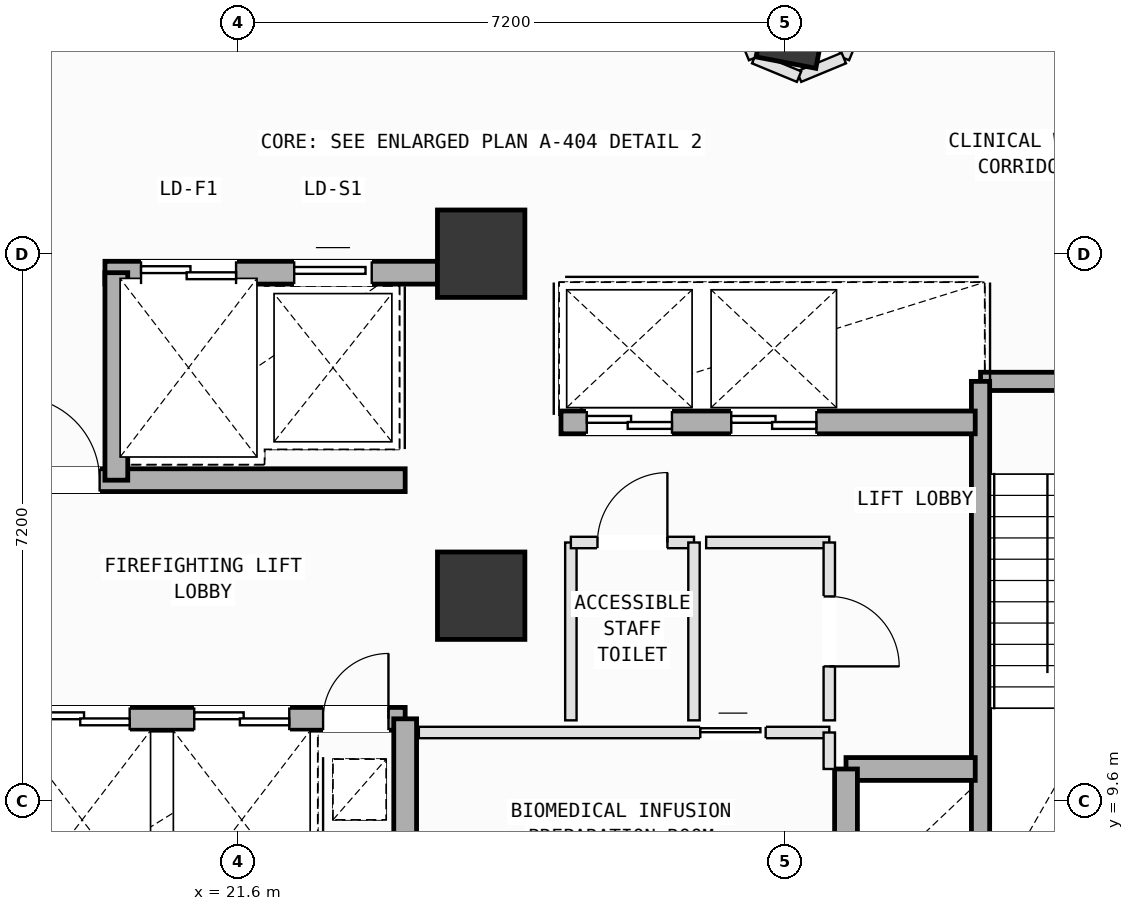
"""IFC4 building model, lengths in metres.
Left out: names, types, materials, properties, quantities, classifications, styles, units other than length and angle.
Written with IfcOpenShell. Run it as: python <this file> out.ifc"""

import sys

from ifc_helpers import new_model, si_unit, direction, frame, frame_2d, origin, origin_2d, place, context, subcontext, project, spatial, rectangle, extrude, element, fill, save


model = new_model("IFC4")
c1 = context("Model", 3, precision=1e-05, world=origin(), true_north=direction((0.0, 1.0)))
c2 = subcontext(c1, "Body", "Model", "MODEL_VIEW")
j1 = project(units=[si_unit("LENGTHUNIT", "METRE"), si_unit("PLANEANGLEUNIT", "RADIAN")], contexts=[c1])
p1 = place(None, origin())
s1 = spatial("IfcSite", under=j1, at=p1, CompositionType="ELEMENT")
p2 = place(p1, origin())
s2 = spatial("IfcBuilding", under=s1, at=p2, CompositionType="ELEMENT")
p3 = place(p2, frame((0.0, 0.0, 169.8)))
s3 = spatial("IfcBuildingStorey", under=s2, at=p3, CompositionType="ELEMENT", Elevation=169.8)
for number, where, z_axis, x_axis in (
    (1, (24.8, 12.3, 0.0), (0.0, 0.0, 1.0), (1.0, 0.0, 0.0)),
    (2, (24.8, 16.8, 0.0), (0.0, 0.0, 1.0), (1.0, 0.0, 0.0)),
):
    element("IfcColumn", number, at=place(p3, frame(where, z_axis=z_axis, x_axis=x_axis)), inside=s3, PredefinedType="COLUMN", context=c2, shape_type="SweptSolid", body=[
        extrude(rectangle(XDim=1.15, YDim=1.15, at=origin_2d()), origin(), (0.0, 0.0, 1.0), 4.0),
    ])
p4 = place(p3, frame((28.941, 20.002, 0.002), z_axis=(0.020030194878, -0.019114179869, 0.99961664623), x_axis=(-0.581006277016, 0.813444565277, 0.027196420538)))
e3 = element("IfcColumn", 3, at=p4, inside=s3, PredefinedType="COLUMN", context=c2, shape_type="SweptSolid", body=[
    extrude(rectangle(XDim=1.4, YDim=0.8, at=origin_2d()), origin(), (0.0, 0.0, 1.0), 3.998),
])
p5 = place(p3, frame((31.37, 15.12, 0.0), z_axis=(0.0, 0.0, 1.0), x_axis=(1.0, 0.0, 0.0)))
e4 = element("IfcWall", 4, at=p5, inside=s3, PredefinedType="SOLIDWALL", context=c2, shape_type="SweptSolid", body=[
    extrude(rectangle(XDim=3.46, YDim=0.24, at=frame_2d((1.73, 0.0))), origin(), (0.0, 0.0, 1.0), 3.78),
])
p6 = place(p5, frame((2.14, 0.0, 0.0)))
e5 = element("IfcOpeningElement", 5, at=p6, cuts=e4, PredefinedType="OPENING", context=c2, shape_type="SweptSolid", body=[
    extrude(rectangle(XDim=1.1, YDim=2.15, at=frame_2d((0.55, 1.075))), frame((0.0, 0.13, 0.0), z_axis=(0.0, -1.0, 0.0), x_axis=(1.0, 0.0, 0.0)), (0.0, 0.0, 1.0), 0.26),
])
p7 = place(p3, frame((31.37, 8.075, 0.0), z_axis=(0.0, 0.0, 1.0), x_axis=(0.0, 1.0, 0.0)))
e6 = element("IfcWall", 6, at=p7, inside=s3, PredefinedType="SOLIDWALL", context=c2, shape_type="SweptSolid", body=[
    extrude(rectangle(XDim=7.045, YDim=0.24, at=frame_2d((3.522, 0.0))), origin(), (0.0, 0.0, 1.0), 3.78),
])
p8 = place(p3, frame((19.85, 16.55, 0.0), z_axis=(0.0, 0.0, 1.0), x_axis=(1.0, 0.0, 0.0)))
e7 = element("IfcWall", 7, at=p8, inside=s3, PredefinedType="SOLIDWALL", context=c2, shape_type="SweptSolid", body=[
    extrude(rectangle(XDim=4.375, YDim=0.3, at=frame_2d((2.188, 0.0))), origin(), (0.0, 0.0, 1.0), 3.78),
])
p9 = place(p8, frame((0.475, 0.0, 0.0)))
e8 = element("IfcOpeningElement", 8, at=p9, cuts=e7, PredefinedType="OPENING", context=c2, shape_type="SweptSolid", body=[
    extrude(rectangle(XDim=1.25, YDim=2.18, at=frame_2d((0.625, 1.09))), frame((0.0, 0.16, 0.0), z_axis=(0.0, -1.0, 0.0), x_axis=(1.0, 0.0, 0.0)), (0.0, 0.0, 1.0), 0.32),
])
p10 = place(p8, frame((2.49, 0.0, 0.0)))
e9 = element("IfcOpeningElement", 9, at=p10, cuts=e7, PredefinedType="OPENING", context=c2, shape_type="SweptSolid", body=[
    extrude(rectangle(XDim=1.02, YDim=2.12, at=frame_2d((0.51, 1.06))), frame((0.0, 0.16, 0.0), z_axis=(0.0, -1.0, 0.0), x_axis=(1.0, 0.0, 0.0)), (0.0, 0.0, 1.0), 0.32),
])
p11 = place(p3, frame((18.5, 10.68, 0.0), z_axis=(0.0, 0.0, 1.0), x_axis=(1.0, 0.0, 0.0)))
e10 = element("IfcWall", 10, at=p11, inside=s3, PredefinedType="SOLIDWALL", context=c2, shape_type="SweptSolid", body=[
    extrude(rectangle(XDim=5.3, YDim=0.3, at=frame_2d((2.65, 0.0))), origin(), (0.0, 0.0, 1.0), 3.78),
])
p12 = place(p11, frame((4.22, 0.0, 0.0)))
e11 = element("IfcOpeningElement", 11, at=p12, cuts=e10, PredefinedType="OPENING", context=c2, shape_type="SweptSolid", body=[
    extrude(rectangle(XDim=0.86, YDim=2.06, at=frame_2d((0.43, 1.03))), frame((0.0, 0.16, 0.0), z_axis=(0.0, -1.0, 0.0), x_axis=(1.0, 0.0, 0.0)), (0.0, 0.0, 1.0), 0.32),
])
p13 = place(p11, frame((0.425, 0.0, 0.0)))
e12 = element("IfcOpeningElement", 12, at=p13, cuts=e10, PredefinedType="OPENING", context=c2, shape_type="SweptSolid", body=[
    extrude(rectangle(XDim=1.25, YDim=2.18, at=frame_2d((0.625, 1.09))), frame((0.0, 0.16, 0.0), z_axis=(0.0, -1.0, 0.0), x_axis=(1.0, 0.0, 0.0)), (0.0, 0.0, 1.0), 0.32),
])
p14 = place(p11, frame((2.525, 0.0, 0.0)))
e13 = element("IfcOpeningElement", 13, at=p14, cuts=e10, PredefinedType="OPENING", context=c2, shape_type="SweptSolid", body=[
    extrude(rectangle(XDim=1.25, YDim=2.18, at=frame_2d((0.625, 1.09))), frame((0.0, 0.16, 0.0), z_axis=(0.0, -1.0, 0.0), x_axis=(1.0, 0.0, 0.0)), (0.0, 0.0, 1.0), 0.32),
])
p15 = place(p3, frame((18.5, 13.82, 0.0), z_axis=(0.0, 0.0, 1.0), x_axis=(1.0, 0.0, 0.0)))
e14 = element("IfcWall", 14, at=p15, inside=s3, PredefinedType="SOLIDWALL", context=c2, shape_type="SweptSolid", body=[
    extrude(rectangle(XDim=5.3, YDim=0.3, at=frame_2d((2.65, 0.0))), origin(), (0.0, 0.0, 1.0), 3.78),
])
p16 = place(p15, frame((0.18, 0.0, 0.0)))
e15 = element("IfcOpeningElement", 15, at=p16, cuts=e14, PredefinedType="OPENING", context=c2, shape_type="SweptSolid", body=[
    extrude(rectangle(XDim=1.1, YDim=2.15, at=frame_2d((0.55, 1.075))), frame((0.0, 0.16, 0.0), z_axis=(0.0, -1.0, 0.0), x_axis=(1.0, 0.0, 0.0)), (0.0, 0.0, 1.0), 0.32),
])
p17 = place(p3, frame((23.8, 8.075, 0.0), z_axis=(0.0, 0.0, 1.0), x_axis=(0.0, 1.0, 0.0)))
e16 = element("IfcWall", 16, at=p17, inside=s3, PredefinedType="SOLIDWALL", context=c2, shape_type="SweptSolid", body=[
    extrude(rectangle(XDim=2.605, YDim=0.3, at=frame_2d((1.302, 0.0))), origin(), (0.0, 0.0, 1.0), 3.78),
])
p18 = place(p3, frame((20.0, 13.82, 0.0), z_axis=(0.0, 0.0, 1.0), x_axis=(0.0, 1.0, 0.0)))
e17 = element("IfcWall", 17, at=p18, inside=s3, PredefinedType="SOLIDWALL", context=c2, shape_type="SweptSolid", body=[
    extrude(rectangle(XDim=2.73, YDim=0.3, at=frame_2d((1.365, 0.0))), origin(), (0.0, 0.0, 1.0), 3.78),
])
p19 = place(p3, frame((29.6, 10.02, 0.0), z_axis=(0.0, 0.0, 1.0), x_axis=(1.0, 0.0, 0.0)))
e18 = element("IfcWall", 18, at=p19, inside=s3, PredefinedType="SOLIDWALL", context=c2, shape_type="SweptSolid", body=[
    extrude(rectangle(XDim=1.7, YDim=0.3, at=frame_2d((0.85, 0.0))), origin(), (0.0, 0.0, 1.0), 3.78),
])
p20 = place(p3, frame((29.6, 8.075, 0.0), z_axis=(0.0, 0.0, 1.0), x_axis=(0.0, 1.0, 0.0)))
e19 = element("IfcWall", 19, at=p20, inside=s3, PredefinedType="SOLIDWALL", context=c2, shape_type="SweptSolid", body=[
    extrude(rectangle(XDim=1.945, YDim=0.3, at=frame_2d((0.973, 0.0))), origin(), (0.0, 0.0, 1.0), 3.78),
])
p21 = place(p3, frame((25.85, 14.58, 0.0), z_axis=(0.0, 0.0, 1.0), x_axis=(1.0, 0.0, 0.0)))
e20 = element("IfcWall", 20, at=p21, inside=s3, PredefinedType="SOLIDWALL", context=c2, shape_type="SweptSolid", body=[
    extrude(rectangle(XDim=5.45, YDim=0.3, at=frame_2d((2.725, 0.0))), origin(), (0.0, 0.0, 1.0), 3.78),
])
p22 = place(p21, frame((0.34, 0.0, 0.0)))
e21 = element("IfcOpeningElement", 21, at=p22, cuts=e20, PredefinedType="OPENING", context=c2, shape_type="SweptSolid", body=[
    extrude(rectangle(XDim=1.12, YDim=2.15, at=frame_2d((0.56, 1.075))), frame((0.0, 0.16, 0.0), z_axis=(0.0, -1.0, 0.0), x_axis=(1.0, 0.0, 0.0)), (0.0, 0.0, 1.0), 0.32),
])
p23 = place(p21, frame((2.24, 0.0, 0.0)))
e22 = element("IfcOpeningElement", 22, at=p23, cuts=e20, PredefinedType="OPENING", context=c2, shape_type="SweptSolid", body=[
    extrude(rectangle(XDim=1.12, YDim=2.15, at=frame_2d((0.56, 1.075))), frame((0.0, 0.16, 0.0), z_axis=(0.0, -1.0, 0.0), x_axis=(1.0, 0.0, 0.0)), (0.0, 0.0, 1.0), 0.32),
])
p24 = place(p3, frame((23.98, 10.5, 0.0), z_axis=(0.0, 0.0, 1.0), x_axis=(1.0, 0.0, 0.0)))
e23 = element("IfcWall", 23, at=p24, inside=s3, PredefinedType="PARTITIONING", context=c2, shape_type="SweptSolid", body=[
    extrude(rectangle(XDim=5.4, YDim=0.15, at=frame_2d((2.7, 0.0))), origin(), (0.0, 0.0, 1.0), 3.78),
])
p25 = place(p24, frame((3.703, 0.0, 0.0)))
e24 = element("IfcOpeningElement", 24, at=p25, cuts=e23, PredefinedType="OPENING", context=c2, shape_type="SweptSolid", body=[
    extrude(rectangle(XDim=0.86, YDim=2.06, at=frame_2d((0.43, 1.03))), frame((0.0, 0.085, 0.0), z_axis=(0.0, -1.0, 0.0), x_axis=(1.0, 0.0, 0.0)), (0.0, 0.0, 1.0), 0.17),
])
p26 = place(p3, frame((29.38, 10.5, 0.0), z_axis=(0.0, 0.0, 1.0), x_axis=(0.0, -1.0, 0.0)))
e25 = element("IfcWall", 25, at=p26, inside=s3, PredefinedType="PARTITIONING", context=c2, shape_type="SweptSolid", body=[
    extrude(rectangle(XDim=0.48, YDim=0.15, at=frame_2d((0.24, 0.0))), origin(), (0.0, 0.0, 1.0), 3.78),
])
p27 = place(p3, frame((25.98, 10.66, 0.0), z_axis=(0.0, 0.0, 1.0), x_axis=(0.0, 1.0, 0.0)))
e26 = element("IfcWall", 26, at=p27, inside=s3, PredefinedType="PARTITIONING", context=c2, shape_type="SweptSolid", body=[
    extrude(rectangle(XDim=2.34, YDim=0.15, at=frame_2d((1.17, 0.0))), origin(), (0.0, 0.0, 1.0), 3.78),
])
p28 = place(p3, frame((25.98, 13.0, 0.0), z_axis=(0.0, 0.0, 1.0), x_axis=(1.0, 0.0, 0.0)))
e27 = element("IfcWall", 27, at=p28, inside=s3, PredefinedType="PARTITIONING", context=c2, shape_type="SweptSolid", body=[
    extrude(rectangle(XDim=1.62, YDim=0.15, at=frame_2d((0.81, 0.0))), origin(), (0.0, 0.0, 1.0), 3.78),
])
p29 = place(p28, frame((0.35, 0.0, 0.0)))
e28 = element("IfcOpeningElement", 28, at=p29, cuts=e27, PredefinedType="OPENING", context=c2, shape_type="SweptSolid", body=[
    extrude(rectangle(XDim=0.92, YDim=2.1, at=frame_2d((0.46, 1.05))), frame((0.0, 0.085, 0.0), z_axis=(0.0, -1.0, 0.0), x_axis=(1.0, 0.0, 0.0)), (0.0, 0.0, 1.0), 0.17),
])
p30 = place(p3, frame((27.6, 13.0, 0.0), z_axis=(0.0, 0.0, 1.0), x_axis=(0.0, -1.0, 0.0)))
e29 = element("IfcWall", 29, at=p30, inside=s3, PredefinedType="PARTITIONING", context=c2, shape_type="SweptSolid", body=[
    extrude(rectangle(XDim=2.34, YDim=0.15, at=frame_2d((1.17, 0.0))), origin(), (0.0, 0.0, 1.0), 3.78),
])
p31 = place(p3, frame((27.76, 13.0, 0.0), z_axis=(0.0, 0.0, 1.0), x_axis=(1.0, 0.0, 0.0)))
e30 = element("IfcWall", 30, at=p31, inside=s3, PredefinedType="PARTITIONING", context=c2, shape_type="SweptSolid", body=[
    extrude(rectangle(XDim=1.62, YDim=0.15, at=frame_2d((0.81, 0.0))), origin(), (0.0, 0.0, 1.0), 3.78),
])
p32 = place(p3, frame((29.38, 13.0, 0.0), z_axis=(0.0, 0.0, 1.0), x_axis=(0.0, -1.0, 0.0)))
e31 = element("IfcWall", 31, at=p32, inside=s3, PredefinedType="PARTITIONING", context=c2, shape_type="SweptSolid", body=[
    extrude(rectangle(XDim=2.34, YDim=0.15, at=frame_2d((1.17, 0.0))), origin(), (0.0, 0.0, 1.0), 3.78),
])
p33 = place(p32, frame((0.71, 0.0, 0.0)))
e32 = element("IfcOpeningElement", 32, at=p33, cuts=e31, PredefinedType="OPENING", context=c2, shape_type="SweptSolid", body=[
    extrude(rectangle(XDim=0.92, YDim=2.1, at=frame_2d((0.46, 1.05))), frame((0.0, 0.085, 0.0), z_axis=(0.0, -1.0, 0.0), x_axis=(1.0, 0.0, 0.0)), (0.0, 0.0, 1.0), 0.17),
])
p34 = place(p3, frame((29.815, 19.964, 0.0), z_axis=(0.0, 0.0, 1.0), x_axis=(-0.381980268386, -0.924170479167, 0.0)))
e33 = element("IfcWall", 33, at=p34, inside=s3, PredefinedType="PARTITIONING", context=c2, shape_type="SweptSolid", body=[
    extrude(rectangle(XDim=0.638, YDim=0.15, at=frame_2d((0.319, 0.0))), origin(), (0.0, 0.0, 1.0), 3.78),
])
p35 = place(p3, frame((29.571, 19.374, 0.0), z_axis=(0.0, 0.0, 1.0), x_axis=(-0.923811477415, -0.382847690599, 0.0)))
e34 = element("IfcWall", 34, at=p35, inside=s3, PredefinedType="PARTITIONING", context=c2, shape_type="SweptSolid", body=[
    extrude(rectangle(XDim=0.638, YDim=0.15, at=frame_2d((0.319, 0.0))), origin(), (0.0, 0.0, 1.0), 3.415),
])
p36 = place(p3, frame((28.982, 19.13, 0.0), z_axis=(0.0, 0.0, 1.0), x_axis=(-0.923979554509, 0.382441868588, 0.0)))
e35 = element("IfcWall", 35, at=p36, inside=s3, PredefinedType="PARTITIONING", context=c2, shape_type="SweptSolid", body=[
    extrude(rectangle(XDim=0.638, YDim=0.15, at=frame_2d((0.319, 0.0))), origin(), (0.0, 0.0, 1.0), 3.78),
])
p37 = place(p3, frame((28.392, 19.374, 0.0), z_axis=(0.0, 0.0, 1.0), x_axis=(-0.382306769343, 0.924035461503, 0.0)))
e36 = element("IfcWall", 36, at=p37, inside=s3, PredefinedType="PARTITIONING", context=c2, shape_type="SweptSolid", body=[
    extrude(rectangle(XDim=0.639, YDim=0.15, at=frame_2d((0.319, 0.0))), origin(), (0.0, 0.0, 1.0), 3.78),
])
p38 = place(p12, origin())
e37 = element("IfcDoor", 37, at=p38, inside=s3, OperationType="SINGLE_SWING_RIGHT", PredefinedType="DOOR", context=c2, shape_type="SweptSolid", body=[
    extrude(rectangle(XDim=0.86, YDim=2.06, at=frame_2d((0.43, 1.03))), frame((0.0, 0.025, 0.0), z_axis=(0.0, -1.0, 0.0), x_axis=(1.0, 0.0, 0.0)), (0.0, 0.0, 1.0), 0.05),
])
fill(e11, e37)
p39 = place(p16, origin())
e38 = element("IfcDoor", 38, at=p39, inside=s3, OperationType="SINGLE_SWING_LEFT", PredefinedType="DOOR", context=c2, shape_type="SweptSolid", body=[
    extrude(rectangle(XDim=1.1, YDim=2.15, at=frame_2d((0.55, 1.075))), frame((0.0, 0.025, 0.0), z_axis=(0.0, -1.0, 0.0), x_axis=(1.0, 0.0, 0.0)), (0.0, 0.0, 1.0), 0.05),
])
fill(e15, e38)
p40 = place(p13, origin())
e39 = element("IfcDoor", 39, at=p40, inside=s3, OperationType="DOUBLE_DOOR_SLIDING", PredefinedType="DOOR", context=c2, shape_type="SweptSolid", body=[
    extrude(rectangle(XDim=1.25, YDim=2.18, at=frame_2d((0.625, 1.09))), frame((0.0, 0.025, 0.0), z_axis=(0.0, -1.0, 0.0), x_axis=(1.0, 0.0, 0.0)), (0.0, 0.0, 1.0), 0.05),
])
fill(e12, e39)
p41 = place(p14, origin())
e40 = element("IfcDoor", 40, at=p41, inside=s3, OperationType="DOUBLE_DOOR_SLIDING", PredefinedType="DOOR", context=c2, shape_type="SweptSolid", body=[
    extrude(rectangle(XDim=1.25, YDim=2.18, at=frame_2d((0.625, 1.09))), frame((0.0, 0.025, 0.0), z_axis=(0.0, -1.0, 0.0), x_axis=(1.0, 0.0, 0.0)), (0.0, 0.0, 1.0), 0.05),
])
fill(e13, e40)
p42 = place(p22, origin())
e41 = element("IfcDoor", 41, at=p42, inside=s3, OperationType="DOUBLE_DOOR_SLIDING", PredefinedType="DOOR", context=c2, shape_type="SweptSolid", body=[
    extrude(rectangle(XDim=1.12, YDim=2.15, at=frame_2d((0.56, 1.075))), frame((0.0, 0.025, 0.0), z_axis=(0.0, -1.0, 0.0), x_axis=(1.0, 0.0, 0.0)), (0.0, 0.0, 1.0), 0.05),
])
fill(e21, e41)
p43 = place(p23, origin())
e42 = element("IfcDoor", 42, at=p43, inside=s3, OperationType="DOUBLE_DOOR_SLIDING", PredefinedType="DOOR", context=c2, shape_type="SweptSolid", body=[
    extrude(rectangle(XDim=1.12, YDim=2.15, at=frame_2d((0.56, 1.075))), frame((0.0, 0.025, 0.0), z_axis=(0.0, -1.0, 0.0), x_axis=(1.0, 0.0, 0.0)), (0.0, 0.0, 1.0), 0.05),
])
fill(e22, e42)
p44 = place(p9, origin())
e43 = element("IfcDoor", 43, at=p44, inside=s3, OperationType="DOUBLE_DOOR_SLIDING", PredefinedType="DOOR", context=c2, shape_type="SweptSolid", body=[
    extrude(rectangle(XDim=1.25, YDim=2.18, at=frame_2d((0.625, 1.09))), frame((0.0, 0.025, 0.0), z_axis=(0.0, -1.0, 0.0), x_axis=(1.0, 0.0, 0.0)), (0.0, 0.0, 1.0), 0.05),
])
fill(e8, e43)
p45 = place(p10, origin())
e44 = element("IfcDoor", 44, at=p45, inside=s3, OperationType="SLIDING_TO_LEFT", PredefinedType="DOOR", context=c2, shape_type="SweptSolid", body=[
    extrude(rectangle(XDim=1.02, YDim=2.12, at=frame_2d((0.51, 1.06))), frame((0.0, 0.025, 0.0), z_axis=(0.0, -1.0, 0.0), x_axis=(1.0, 0.0, 0.0)), (0.0, 0.0, 1.0), 0.05),
])
fill(e9, e44)
p46 = place(p29, origin())
e45 = element("IfcDoor", 45, at=p46, inside=s3, OperationType="SINGLE_SWING_RIGHT", PredefinedType="DOOR", context=c2, shape_type="SweptSolid", body=[
    extrude(rectangle(XDim=0.92, YDim=2.1, at=frame_2d((0.46, 1.05))), frame((0.0, 0.025, 0.0), z_axis=(0.0, -1.0, 0.0), x_axis=(1.0, 0.0, 0.0)), (0.0, 0.0, 1.0), 0.05),
])
fill(e28, e45)
p47 = place(p33, origin())
e46 = element("IfcDoor", 46, at=p47, inside=s3, OperationType="SINGLE_SWING_RIGHT", PredefinedType="DOOR", context=c2, shape_type="SweptSolid", body=[
    extrude(rectangle(XDim=0.92, YDim=2.1, at=frame_2d((0.46, 1.05))), frame((0.0, 0.025, 0.0), z_axis=(0.0, -1.0, 0.0), x_axis=(1.0, 0.0, 0.0)), (0.0, 0.0, 1.0), 0.05),
])
fill(e32, e46)
p48 = place(p25, origin())
e47 = element("IfcDoor", 47, at=p48, inside=s3, OperationType="SLIDING_TO_LEFT", PredefinedType="DOOR", context=c2, shape_type="SweptSolid", body=[
    extrude(rectangle(XDim=0.86, YDim=2.06, at=frame_2d((0.43, 1.03))), frame((0.0, 0.025, 0.0), z_axis=(0.0, -1.0, 0.0), x_axis=(1.0, 0.0, 0.0)), (0.0, 0.0, 1.0), 0.05),
])
fill(e24, e47)
save(model, sys.argv[1])
